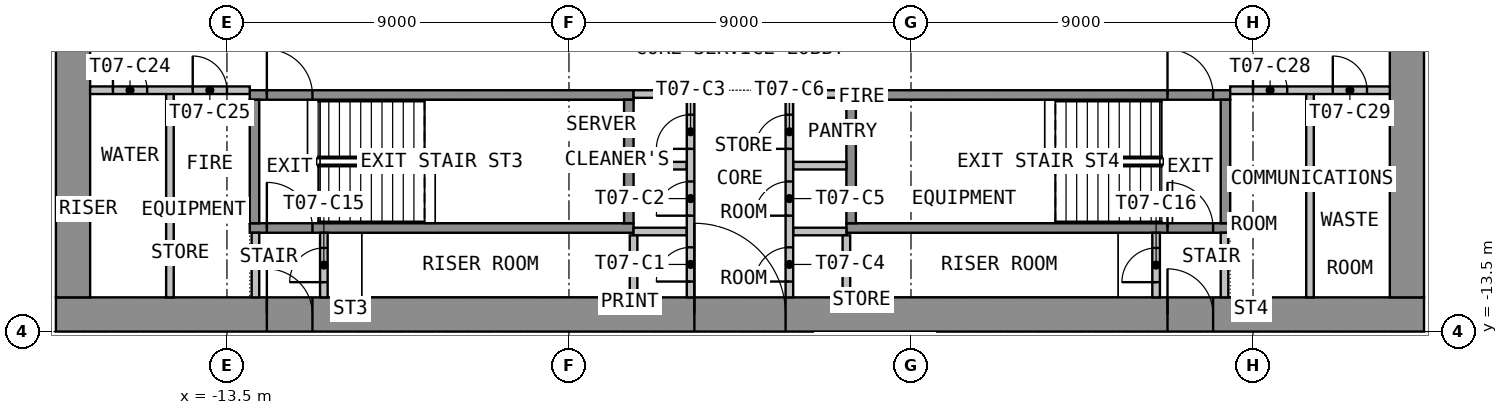
"""IFC4 building model, lengths in metres.
Left out: names, types, materials, properties, quantities, classifications, styles, units other than length and angle.
Written with IfcOpenShell. Run it as: python <this file> out.ifc"""

import sys

from ifc_helpers import new_model, si_unit, direction, frame, frame_2d, origin, place, context, subcontext, project, spatial, rectangle, extrude, element, fill, save


model = new_model("IFC4")
c1 = context("Model", 3, precision=1e-05, world=origin(), true_north=direction((0.0, 1.0)))
c2 = subcontext(c1, "Body", "Model", "MODEL_VIEW")
j1 = project(units=[si_unit("LENGTHUNIT", "METRE"), si_unit("PLANEANGLEUNIT", "RADIAN")], contexts=[c1])
p1 = place(None, origin())
s1 = spatial("IfcSite", under=j1, at=p1, CompositionType="ELEMENT")
p2 = place(p1, origin())
s2 = spatial("IfcBuilding", under=s1, at=p2, CompositionType="ELEMENT")
p3 = place(p2, frame((0.0, 0.0, 104.7)))
s3 = spatial("IfcBuildingStorey", under=s2, at=p3, CompositionType="ELEMENT", Elevation=104.7)
p4 = place(p3, frame((-18.0, -13.05, 0.0), z_axis=(0.0, 0.0, 1.0), x_axis=(1.0, 0.0, 0.0)))
e1 = element("IfcWall", 1, at=p4, inside=s3, PredefinedType="SHEAR", context=c2, shape_type="SweptSolid", body=[
    extrude(rectangle(XDim=36.0, YDim=0.9, at=frame_2d((18.0, 0.0))), origin(), (0.0, 0.0, 1.0), 3.525),
])
p5 = place(p4, frame((16.8, 0.0, 0.0)))
e2 = element("IfcOpeningElement", 2, at=p5, cuts=e1, PredefinedType="OPENING", context=c2, shape_type="SweptSolid", body=[
    extrude(rectangle(XDim=2.4, YDim=2.1, at=frame_2d((1.2, 1.05))), frame((0.0, 0.46, 0.0), z_axis=(0.0, -1.0, 0.0), x_axis=(1.0, 0.0, 0.0)), (0.0, 0.0, 1.0), 0.92),
])
p6 = place(p4, frame((5.55, 0.0, 0.0)))
e3 = element("IfcOpeningElement", 3, at=p6, cuts=e1, PredefinedType="OPENING", context=c2, shape_type="SweptSolid", body=[
    extrude(rectangle(XDim=1.2, YDim=2.1, at=frame_2d((0.6, 1.05))), frame((0.0, 0.46, 0.0), z_axis=(0.0, -1.0, 0.0), x_axis=(1.0, 0.0, 0.0)), (0.0, 0.0, 1.0), 0.92),
])
p7 = place(p4, frame((29.25, 0.0, 0.0)))
e4 = element("IfcOpeningElement", 4, at=p7, cuts=e1, PredefinedType="OPENING", context=c2, shape_type="SweptSolid", body=[
    extrude(rectangle(XDim=1.2, YDim=2.1, at=frame_2d((0.6, 1.05))), frame((0.0, 0.46, 0.0), z_axis=(0.0, -1.0, 0.0), x_axis=(1.0, 0.0, 0.0)), (0.0, 0.0, 1.0), 0.92),
])
p8 = place(p3, frame((-17.55, -12.6, 0.0), z_axis=(0.0, 0.0, 1.0), x_axis=(0.0, 1.0, 0.0)))
e5 = element("IfcWall", 5, at=p8, inside=s3, PredefinedType="SHEAR", context=c2, shape_type="SweptSolid", body=[
    extrude(rectangle(XDim=25.2, YDim=0.9, at=frame_2d((12.6, 0.0))), origin(), (0.0, 0.0, 1.0), 3.525),
])
p9 = place(p8, frame((11.4, 0.0, 0.0)))
e6 = element("IfcOpeningElement", 6, at=p9, cuts=e5, PredefinedType="OPENING", context=c2, shape_type="SweptSolid", body=[
    extrude(rectangle(XDim=2.4, YDim=2.1, at=frame_2d((1.2, 1.05))), frame((0.0, 0.46, 0.0), z_axis=(0.0, -1.0, 0.0), x_axis=(1.0, 0.0, 0.0)), (0.0, 0.0, 1.0), 0.92),
])
p10 = place(p3, frame((17.55, -12.6, 0.0), z_axis=(0.0, 0.0, 1.0), x_axis=(0.0, 1.0, 0.0)))
e7 = element("IfcWall", 7, at=p10, inside=s3, PredefinedType="SHEAR", context=c2, shape_type="SweptSolid", body=[
    extrude(rectangle(XDim=25.2, YDim=0.9, at=frame_2d((12.6, 0.0))), origin(), (0.0, 0.0, 1.0), 3.525),
])
p11 = place(p10, frame((11.4, 0.0, 0.0)))
e8 = element("IfcOpeningElement", 8, at=p11, cuts=e7, PredefinedType="OPENING", context=c2, shape_type="SweptSolid", body=[
    extrude(rectangle(XDim=2.4, YDim=2.1, at=frame_2d((1.2, 1.05))), frame((0.0, 0.46, 0.0), z_axis=(0.0, -1.0, 0.0), x_axis=(1.0, 0.0, 0.0)), (0.0, 0.0, 1.0), 0.92),
])
p12 = place(p3, frame((-12.9, -10.775, 0.0), z_axis=(0.0, 0.0, 1.0), x_axis=(1.0, 0.0, 0.0)))
e9 = element("IfcWall", 9, at=p12, inside=s3, PredefinedType="SHEAR", context=c2, shape_type="SweptSolid", body=[
    extrude(rectangle(XDim=10.1, YDim=0.25, at=frame_2d((5.05, 0.0))), origin(), (0.0, 0.0, 1.0), 3.525),
])
p13 = place(p12, frame((0.45, 0.0, 0.0)))
e10 = element("IfcOpeningElement", 10, at=p13, cuts=e9, PredefinedType="OPENING", context=c2, shape_type="SweptSolid", body=[
    extrude(rectangle(XDim=1.2, YDim=2.1, at=frame_2d((0.6, 1.05))), frame((0.0, 0.135, 0.0), z_axis=(0.0, -1.0, 0.0), x_axis=(1.0, 0.0, 0.0)), (0.0, 0.0, 1.0), 0.27),
])
p14 = place(p3, frame((-12.9, -7.275, 0.0), z_axis=(0.0, 0.0, 1.0), x_axis=(1.0, 0.0, 0.0)))
e11 = element("IfcWall", 11, at=p14, inside=s3, PredefinedType="SHEAR", context=c2, shape_type="SweptSolid", body=[
    extrude(rectangle(XDim=10.1, YDim=0.25, at=frame_2d((5.05, 0.0))), origin(), (0.0, 0.0, 1.0), 3.525),
])
p15 = place(p14, frame((0.45, 0.0, 0.0)))
e12 = element("IfcOpeningElement", 12, at=p15, cuts=e11, PredefinedType="OPENING", context=c2, shape_type="SweptSolid", body=[
    extrude(rectangle(XDim=1.2, YDim=2.1, at=frame_2d((0.6, 1.05))), frame((0.0, 0.135, 0.0), z_axis=(0.0, -1.0, 0.0), x_axis=(1.0, 0.0, 0.0)), (0.0, 0.0, 1.0), 0.27),
])
for number, where, z_axis, x_axis in (
    (13, (-12.775, -10.65, 0.0), (0.0, 0.0, 1.0), (0.0, 1.0, 0.0)),
    (14, (-2.925, -10.65, 0.0), (0.0, 0.0, 1.0), (0.0, 1.0, 0.0)),
):
    element("IfcWall", number, at=place(p3, frame(where, z_axis=z_axis, x_axis=x_axis)), inside=s3, PredefinedType="SHEAR", context=c2, shape_type="SweptSolid", body=[
        extrude(rectangle(XDim=3.25, YDim=0.25, at=frame_2d((1.625, 0.0))), origin(), (0.0, 0.0, 1.0), 3.525),
    ])
p16 = place(p3, frame((2.8, -10.775, 0.0), z_axis=(0.0, 0.0, 1.0), x_axis=(1.0, 0.0, 0.0)))
e15 = element("IfcWall", 15, at=p16, inside=s3, PredefinedType="SHEAR", context=c2, shape_type="SweptSolid", body=[
    extrude(rectangle(XDim=10.1, YDim=0.25, at=frame_2d((5.05, 0.0))), origin(), (0.0, 0.0, 1.0), 3.525),
])
p17 = place(p16, frame((8.45, 0.0, 0.0)))
e16 = element("IfcOpeningElement", 16, at=p17, cuts=e15, PredefinedType="OPENING", context=c2, shape_type="SweptSolid", body=[
    extrude(rectangle(XDim=1.2, YDim=2.1, at=frame_2d((0.6, 1.05))), frame((0.0, 0.135, 0.0), z_axis=(0.0, -1.0, 0.0), x_axis=(1.0, 0.0, 0.0)), (0.0, 0.0, 1.0), 0.27),
])
p18 = place(p3, frame((2.8, -7.275, 0.0), z_axis=(0.0, 0.0, 1.0), x_axis=(1.0, 0.0, 0.0)))
e17 = element("IfcWall", 17, at=p18, inside=s3, PredefinedType="SHEAR", context=c2, shape_type="SweptSolid", body=[
    extrude(rectangle(XDim=10.1, YDim=0.25, at=frame_2d((5.05, 0.0))), origin(), (0.0, 0.0, 1.0), 3.525),
])
p19 = place(p18, frame((8.45, 0.0, 0.0)))
e18 = element("IfcOpeningElement", 18, at=p19, cuts=e17, PredefinedType="OPENING", context=c2, shape_type="SweptSolid", body=[
    extrude(rectangle(XDim=1.2, YDim=2.1, at=frame_2d((0.6, 1.05))), frame((0.0, 0.135, 0.0), z_axis=(0.0, -1.0, 0.0), x_axis=(1.0, 0.0, 0.0)), (0.0, 0.0, 1.0), 0.27),
])
for number, where, z_axis, x_axis in (
    (19, (2.925, -10.65, 0.0), (0.0, 0.0, 1.0), (0.0, 1.0, 0.0)),
    (20, (12.775, -10.65, 0.0), (0.0, 0.0, 1.0), (0.0, 1.0, 0.0)),
):
    element("IfcWall", number, at=place(p3, frame(where, z_axis=z_axis, x_axis=x_axis)), inside=s3, PredefinedType="SHEAR", context=c2, shape_type="SweptSolid", body=[
        extrude(rectangle(XDim=3.25, YDim=0.25, at=frame_2d((1.625, 0.0))), origin(), (0.0, 0.0, 1.0), 3.525),
    ])
for number, where, z_axis, x_axis in (
    (21, (-2.8, -7.25, 0.0), (0.0, 0.0, 1.0), (1.0, 0.0, 0.0)),
    (22, (-2.8, -9.135, 0.0), (0.0, 0.0, 1.0), (1.0, 0.0, 0.0)),
    (23, (-2.8, -10.867, 0.0), (0.0, 0.0, 1.0), (1.0, 0.0, 0.0)),
    (24, (1.4, -7.25, 0.0), (0.0, 0.0, 1.0), (1.0, 0.0, 0.0)),
    (25, (1.4, -9.135, 0.0), (0.0, 0.0, 1.0), (1.0, 0.0, 0.0)),
    (26, (1.4, -10.867, 0.0), (0.0, 0.0, 1.0), (1.0, 0.0, 0.0)),
):
    element("IfcWall", number, at=place(p3, frame(where, z_axis=z_axis, x_axis=x_axis)), inside=s3, PredefinedType="PARTITIONING", context=c2, shape_type="SweptSolid", body=[
        extrude(rectangle(XDim=1.4, YDim=0.2, at=frame_2d((0.7, 0.0))), origin(), (0.0, 0.0, 1.0), 3.525),
    ])
p20 = place(p3, frame((-1.3, -12.6, 0.0), z_axis=(0.0, 0.0, 1.0), x_axis=(0.0, 1.0, 0.0)))
e27 = element("IfcWall", 27, at=p20, inside=s3, PredefinedType="PARTITIONING", context=c2, shape_type="SweptSolid", body=[
    extrude(rectangle(XDim=5.45, YDim=0.2, at=frame_2d((2.725, 0.0))), origin(), (0.0, 0.0, 1.0), 3.525),
])
p21 = place(p20, frame((0.416, 0.0, 0.0)))
e28 = element("IfcOpeningElement", 28, at=p21, cuts=e27, PredefinedType="OPENING", context=c2, shape_type="SweptSolid", body=[
    extrude(rectangle(XDim=0.9, YDim=2.1, at=frame_2d((0.45, 1.05))), frame((0.0, 0.11, 0.0), z_axis=(0.0, -1.0, 0.0), x_axis=(1.0, 0.0, 0.0)), (0.0, 0.0, 1.0), 0.22),
])
p22 = place(p20, frame((2.149, 0.0, 0.0)))
e29 = element("IfcOpeningElement", 29, at=p22, cuts=e27, PredefinedType="OPENING", context=c2, shape_type="SweptSolid", body=[
    extrude(rectangle(XDim=0.9, YDim=2.1, at=frame_2d((0.45, 1.05))), frame((0.0, 0.11, 0.0), z_axis=(0.0, -1.0, 0.0), x_axis=(1.0, 0.0, 0.0)), (0.0, 0.0, 1.0), 0.22),
])
p23 = place(p20, frame((3.907, 0.0, 0.0)))
e30 = element("IfcOpeningElement", 30, at=p23, cuts=e27, PredefinedType="OPENING", context=c2, shape_type="SweptSolid", body=[
    extrude(rectangle(XDim=0.9, YDim=2.1, at=frame_2d((0.45, 1.05))), frame((0.0, 0.11, 0.0), z_axis=(0.0, -1.0, 0.0), x_axis=(1.0, 0.0, 0.0)), (0.0, 0.0, 1.0), 0.22),
])
p24 = place(p3, frame((1.3, -12.6, 0.0), z_axis=(0.0, 0.0, 1.0), x_axis=(0.0, 1.0, 0.0)))
e31 = element("IfcWall", 31, at=p24, inside=s3, PredefinedType="PARTITIONING", context=c2, shape_type="SweptSolid", body=[
    extrude(rectangle(XDim=5.45, YDim=0.2, at=frame_2d((2.725, 0.0))), origin(), (0.0, 0.0, 1.0), 3.525),
])
p25 = place(p24, frame((0.416, 0.0, 0.0)))
e32 = element("IfcOpeningElement", 32, at=p25, cuts=e31, PredefinedType="OPENING", context=c2, shape_type="SweptSolid", body=[
    extrude(rectangle(XDim=0.9, YDim=2.1, at=frame_2d((0.45, 1.05))), frame((0.0, 0.11, 0.0), z_axis=(0.0, -1.0, 0.0), x_axis=(1.0, 0.0, 0.0)), (0.0, 0.0, 1.0), 0.22),
])
p26 = place(p24, frame((2.149, 0.0, 0.0)))
e33 = element("IfcOpeningElement", 33, at=p26, cuts=e31, PredefinedType="OPENING", context=c2, shape_type="SweptSolid", body=[
    extrude(rectangle(XDim=0.9, YDim=2.1, at=frame_2d((0.45, 1.05))), frame((0.0, 0.11, 0.0), z_axis=(0.0, -1.0, 0.0), x_axis=(1.0, 0.0, 0.0)), (0.0, 0.0, 1.0), 0.22),
])
p27 = place(p24, frame((3.907, 0.0, 0.0)))
e34 = element("IfcOpeningElement", 34, at=p27, cuts=e31, PredefinedType="OPENING", context=c2, shape_type="SweptSolid", body=[
    extrude(rectangle(XDim=0.9, YDim=2.1, at=frame_2d((0.45, 1.05))), frame((0.0, 0.11, 0.0), z_axis=(0.0, -1.0, 0.0), x_axis=(1.0, 0.0, 0.0)), (0.0, 0.0, 1.0), 0.22),
])
p28 = place(p3, frame((-12.75, -12.6, 0.0), z_axis=(0.0, 0.0, 1.0), x_axis=(0.0, 1.0, 0.0)))
e35 = element("IfcWall", 35, at=p28, inside=s3, PredefinedType="PARTITIONING", context=c2, shape_type="SweptSolid", body=[
    extrude(rectangle(XDim=1.7, YDim=0.2, at=frame_2d((0.85, 0.0))), origin(), (0.0, 0.0, 1.0), 3.525),
])
p29 = place(p3, frame((-10.95, -12.6, 0.0), z_axis=(0.0, 0.0, 1.0), x_axis=(0.0, 1.0, 0.0)))
e36 = element("IfcWall", 36, at=p29, inside=s3, PredefinedType="PARTITIONING", context=c2, shape_type="SweptSolid", body=[
    extrude(rectangle(XDim=1.7, YDim=0.2, at=frame_2d((0.85, 0.0))), origin(), (0.0, 0.0, 1.0), 3.525),
])
p30 = place(p29, frame((0.4, 0.0, 0.0)))
e37 = element("IfcOpeningElement", 37, at=p30, cuts=e36, PredefinedType="OPENING", context=c2, shape_type="SweptSolid", body=[
    extrude(rectangle(XDim=0.9, YDim=2.1, at=frame_2d((0.45, 1.05))), frame((0.0, 0.11, 0.0), z_axis=(0.0, -1.0, 0.0), x_axis=(1.0, 0.0, 0.0)), (0.0, 0.0, 1.0), 0.22),
])
p31 = place(p3, frame((12.75, -12.6, 0.0), z_axis=(0.0, 0.0, 1.0), x_axis=(0.0, 1.0, 0.0)))
e38 = element("IfcWall", 38, at=p31, inside=s3, PredefinedType="PARTITIONING", context=c2, shape_type="SweptSolid", body=[
    extrude(rectangle(XDim=1.7, YDim=0.2, at=frame_2d((0.85, 0.0))), origin(), (0.0, 0.0, 1.0), 3.525),
])
p32 = place(p3, frame((10.95, -12.6, 0.0), z_axis=(0.0, 0.0, 1.0), x_axis=(0.0, 1.0, 0.0)))
e39 = element("IfcWall", 39, at=p32, inside=s3, PredefinedType="PARTITIONING", context=c2, shape_type="SweptSolid", body=[
    extrude(rectangle(XDim=1.7, YDim=0.2, at=frame_2d((0.85, 0.0))), origin(), (0.0, 0.0, 1.0), 3.525),
])
p33 = place(p32, frame((0.4, 0.0, 0.0)))
e40 = element("IfcOpeningElement", 40, at=p33, cuts=e39, PredefinedType="OPENING", context=c2, shape_type="SweptSolid", body=[
    extrude(rectangle(XDim=0.9, YDim=2.1, at=frame_2d((0.45, 1.05))), frame((0.0, 0.11, 0.0), z_axis=(0.0, -1.0, 0.0), x_axis=(1.0, 0.0, 0.0)), (0.0, 0.0, 1.0), 0.22),
])
p34 = place(p3, frame((-15.0, -12.6, 0.0), z_axis=(0.0, 0.0, 1.0), x_axis=(0.0, 1.0, 0.0)))
e41 = element("IfcWall", 41, at=p34, inside=s3, PredefinedType="PARTITIONING", context=c2, shape_type="SweptSolid", body=[
    extrude(rectangle(XDim=5.45, YDim=0.2, at=frame_2d((2.725, 0.0))), origin(), (0.0, 0.0, 1.0), 3.525),
])
p35 = place(p3, frame((-17.1, -7.15, 0.0), z_axis=(0.0, 0.0, 1.0), x_axis=(1.0, 0.0, 0.0)))
e42 = element("IfcWall", 42, at=p35, inside=s3, PredefinedType="PARTITIONING", context=c2, shape_type="SweptSolid", body=[
    extrude(rectangle(XDim=4.2, YDim=0.2, at=frame_2d((2.1, 0.0))), origin(), (0.0, 0.0, 1.0), 3.525),
])
p36 = place(p35, frame((0.6, 0.0, 0.0)))
e43 = element("IfcOpeningElement", 43, at=p36, cuts=e42, PredefinedType="OPENING", context=c2, shape_type="SweptSolid", body=[
    extrude(rectangle(XDim=0.9, YDim=2.1, at=frame_2d((0.45, 1.05))), frame((0.0, 0.11, 0.0), z_axis=(0.0, -1.0, 0.0), x_axis=(1.0, 0.0, 0.0)), (0.0, 0.0, 1.0), 0.22),
])
p37 = place(p35, frame((2.7, 0.0, 0.0)))
e44 = element("IfcOpeningElement", 44, at=p37, cuts=e42, PredefinedType="OPENING", context=c2, shape_type="SweptSolid", body=[
    extrude(rectangle(XDim=0.9, YDim=2.1, at=frame_2d((0.45, 1.05))), frame((0.0, 0.11, 0.0), z_axis=(0.0, -1.0, 0.0), x_axis=(1.0, 0.0, 0.0)), (0.0, 0.0, 1.0), 0.22),
])
p38 = place(p3, frame((15.0, -12.6, 0.0), z_axis=(0.0, 0.0, 1.0), x_axis=(0.0, 1.0, 0.0)))
e45 = element("IfcWall", 45, at=p38, inside=s3, PredefinedType="PARTITIONING", context=c2, shape_type="SweptSolid", body=[
    extrude(rectangle(XDim=5.45, YDim=0.2, at=frame_2d((2.725, 0.0))), origin(), (0.0, 0.0, 1.0), 3.525),
])
p39 = place(p3, frame((12.9, -7.15, 0.0), z_axis=(0.0, 0.0, 1.0), x_axis=(1.0, 0.0, 0.0)))
e46 = element("IfcWall", 46, at=p39, inside=s3, PredefinedType="PARTITIONING", context=c2, shape_type="SweptSolid", body=[
    extrude(rectangle(XDim=4.2, YDim=0.2, at=frame_2d((2.1, 0.0))), origin(), (0.0, 0.0, 1.0), 3.525),
])
p40 = place(p39, frame((0.6, 0.0, 0.0)))
e47 = element("IfcOpeningElement", 47, at=p40, cuts=e46, PredefinedType="OPENING", context=c2, shape_type="SweptSolid", body=[
    extrude(rectangle(XDim=0.9, YDim=2.1, at=frame_2d((0.45, 1.05))), frame((0.0, 0.11, 0.0), z_axis=(0.0, -1.0, 0.0), x_axis=(1.0, 0.0, 0.0)), (0.0, 0.0, 1.0), 0.22),
])
p41 = place(p39, frame((2.7, 0.0, 0.0)))
e48 = element("IfcOpeningElement", 48, at=p41, cuts=e46, PredefinedType="OPENING", context=c2, shape_type="SweptSolid", body=[
    extrude(rectangle(XDim=0.9, YDim=2.1, at=frame_2d((0.45, 1.05))), frame((0.0, 0.11, 0.0), z_axis=(0.0, -1.0, 0.0), x_axis=(1.0, 0.0, 0.0)), (0.0, 0.0, 1.0), 0.22),
])
for number, where, z_axis, x_axis in (
    (49, (-2.8, -12.599, 0.0), (0.0, 0.0, 1.0), (0.0, 1.0, 0.0)),
    (50, (2.8, -12.599, 0.0), (0.0, 0.0, 1.0), (0.0, 1.0, 0.0)),
):
    element("IfcWall", number, at=place(p3, frame(where, z_axis=z_axis, x_axis=x_axis)), inside=s3, PredefinedType="PARTITIONING", context=c2, shape_type="SweptSolid", body=[
        extrude(rectangle(XDim=1.631, YDim=0.2, at=frame_2d((0.815, 0.0))), origin(), (0.0, 0.0, 1.0), 3.525),
    ])
p42 = place(p5, origin())
e51 = element("IfcDoor", 51, at=p42, inside=s3, OperationType="DOUBLE_DOOR_DOUBLE_SWING", PredefinedType="DOOR", context=c2, shape_type="SweptSolid", body=[
    extrude(rectangle(XDim=2.4, YDim=2.1, at=frame_2d((1.2, 1.05))), frame((0.0, 0.025, 0.0), z_axis=(0.0, -1.0, 0.0), x_axis=(1.0, 0.0, 0.0)), (0.0, 0.0, 1.0), 0.05),
])
fill(e2, e51)
p43 = place(p6, origin())
e52 = element("IfcDoor", 52, at=p43, inside=s3, OperationType="SINGLE_SWING_RIGHT", PredefinedType="DOOR", context=c2, shape_type="SweptSolid", body=[
    extrude(rectangle(XDim=1.2, YDim=2.1, at=frame_2d((0.6, 1.05))), frame((0.0, 0.025, 0.0), z_axis=(0.0, -1.0, 0.0), x_axis=(1.0, 0.0, 0.0)), (0.0, 0.0, 1.0), 0.05),
])
fill(e3, e52)
p44 = place(p7, origin())
e53 = element("IfcDoor", 53, at=p44, inside=s3, OperationType="SINGLE_SWING_RIGHT", PredefinedType="DOOR", context=c2, shape_type="SweptSolid", body=[
    extrude(rectangle(XDim=1.2, YDim=2.1, at=frame_2d((0.6, 1.05))), frame((0.0, 0.025, 0.0), z_axis=(0.0, -1.0, 0.0), x_axis=(1.0, 0.0, 0.0)), (0.0, 0.0, 1.0), 0.05),
])
fill(e4, e53)
p45 = place(p15, origin())
e54 = element("IfcDoor", 54, at=p45, inside=s3, OperationType="SINGLE_SWING_LEFT", PredefinedType="DOOR", context=c2, shape_type="SweptSolid", body=[
    extrude(rectangle(XDim=1.2, YDim=2.1, at=frame_2d((0.6, 1.05))), frame((0.0, 0.025, 0.0), z_axis=(0.0, -1.0, 0.0), x_axis=(1.0, 0.0, 0.0)), (0.0, 0.0, 1.0), 0.05),
])
fill(e12, e54)
p46 = place(p19, origin())
e55 = element("IfcDoor", 55, at=p46, inside=s3, OperationType="SINGLE_SWING_LEFT", PredefinedType="DOOR", context=c2, shape_type="SweptSolid", body=[
    extrude(rectangle(XDim=1.2, YDim=2.1, at=frame_2d((0.6, 1.05))), frame((0.0, 0.025, 0.0), z_axis=(0.0, -1.0, 0.0), x_axis=(1.0, 0.0, 0.0)), (0.0, 0.0, 1.0), 0.05),
])
fill(e18, e55)
p47 = place(p21, origin())
e56 = element("IfcDoor", 56, at=p47, inside=s3, OperationType="SINGLE_SWING_LEFT", PredefinedType="DOOR", context=c2, shape_type="SweptSolid", body=[
    extrude(rectangle(XDim=0.9, YDim=2.1, at=frame_2d((0.45, 1.05))), frame((0.0, 0.025, 0.0), z_axis=(0.0, -1.0, 0.0), x_axis=(1.0, 0.0, 0.0)), (0.0, 0.0, 1.0), 0.05),
])
fill(e28, e56)
p48 = place(p22, origin())
e57 = element("IfcDoor", 57, at=p48, inside=s3, OperationType="SINGLE_SWING_LEFT", PredefinedType="DOOR", context=c2, shape_type="SweptSolid", body=[
    extrude(rectangle(XDim=0.9, YDim=2.1, at=frame_2d((0.45, 1.05))), frame((0.0, 0.025, 0.0), z_axis=(0.0, -1.0, 0.0), x_axis=(1.0, 0.0, 0.0)), (0.0, 0.0, 1.0), 0.05),
])
fill(e29, e57)
p49 = place(p23, origin())
e58 = element("IfcDoor", 58, at=p49, inside=s3, OperationType="SINGLE_SWING_LEFT", PredefinedType="DOOR", context=c2, shape_type="SweptSolid", body=[
    extrude(rectangle(XDim=0.9, YDim=2.1, at=frame_2d((0.45, 1.05))), frame((0.0, 0.025, 0.0), z_axis=(0.0, -1.0, 0.0), x_axis=(1.0, 0.0, 0.0)), (0.0, 0.0, 1.0), 0.05),
])
fill(e30, e58)
p50 = place(p25, origin())
e59 = element("IfcDoor", 59, at=p50, inside=s3, OperationType="SINGLE_SWING_LEFT", PredefinedType="DOOR", context=c2, shape_type="SweptSolid", body=[
    extrude(rectangle(XDim=0.9, YDim=2.1, at=frame_2d((0.45, 1.05))), frame((0.0, 0.025, 0.0), z_axis=(0.0, -1.0, 0.0), x_axis=(1.0, 0.0, 0.0)), (0.0, 0.0, 1.0), 0.05),
])
fill(e32, e59)
p51 = place(p26, origin())
e60 = element("IfcDoor", 60, at=p51, inside=s3, OperationType="SINGLE_SWING_LEFT", PredefinedType="DOOR", context=c2, shape_type="SweptSolid", body=[
    extrude(rectangle(XDim=0.9, YDim=2.1, at=frame_2d((0.45, 1.05))), frame((0.0, 0.025, 0.0), z_axis=(0.0, -1.0, 0.0), x_axis=(1.0, 0.0, 0.0)), (0.0, 0.0, 1.0), 0.05),
])
fill(e33, e60)
p52 = place(p27, origin())
e61 = element("IfcDoor", 61, at=p52, inside=s3, OperationType="SINGLE_SWING_LEFT", PredefinedType="DOOR", context=c2, shape_type="SweptSolid", body=[
    extrude(rectangle(XDim=0.9, YDim=2.1, at=frame_2d((0.45, 1.05))), frame((0.0, 0.025, 0.0), z_axis=(0.0, -1.0, 0.0), x_axis=(1.0, 0.0, 0.0)), (0.0, 0.0, 1.0), 0.05),
])
fill(e34, e61)
p53 = place(p13, origin())
e62 = element("IfcDoor", 62, at=p53, inside=s3, OperationType="SINGLE_SWING_RIGHT", PredefinedType="DOOR", context=c2, shape_type="SweptSolid", body=[
    extrude(rectangle(XDim=1.2, YDim=2.1, at=frame_2d((0.6, 1.05))), frame((0.0, 0.025, 0.0), z_axis=(0.0, -1.0, 0.0), x_axis=(1.0, 0.0, 0.0)), (0.0, 0.0, 1.0), 0.05),
])
fill(e10, e62)
p54 = place(p30, origin())
e63 = element("IfcDoor", 63, at=p54, inside=s3, OperationType="SINGLE_SWING_LEFT", PredefinedType="DOOR", context=c2, shape_type="SweptSolid", body=[
    extrude(rectangle(XDim=0.9, YDim=2.1, at=frame_2d((0.45, 1.05))), frame((0.0, 0.025, 0.0), z_axis=(0.0, -1.0, 0.0), x_axis=(1.0, 0.0, 0.0)), (0.0, 0.0, 1.0), 0.05),
])
fill(e37, e63)
p55 = place(p17, origin())
e64 = element("IfcDoor", 64, at=p55, inside=s3, OperationType="SINGLE_SWING_RIGHT", PredefinedType="DOOR", context=c2, shape_type="SweptSolid", body=[
    extrude(rectangle(XDim=1.2, YDim=2.1, at=frame_2d((0.6, 1.05))), frame((0.0, 0.025, 0.0), z_axis=(0.0, -1.0, 0.0), x_axis=(1.0, 0.0, 0.0)), (0.0, 0.0, 1.0), 0.05),
])
fill(e16, e64)
p56 = place(p33, origin())
e65 = element("IfcDoor", 65, at=p56, inside=s3, OperationType="SINGLE_SWING_LEFT", PredefinedType="DOOR", context=c2, shape_type="SweptSolid", body=[
    extrude(rectangle(XDim=0.9, YDim=2.1, at=frame_2d((0.45, 1.05))), frame((0.0, 0.025, 0.0), z_axis=(0.0, -1.0, 0.0), x_axis=(1.0, 0.0, 0.0)), (0.0, 0.0, 1.0), 0.05),
])
fill(e40, e65)
p57 = place(p36, origin())
e66 = element("IfcDoor", 66, at=p57, inside=s3, OperationType="SINGLE_SWING_LEFT", PredefinedType="DOOR", context=c2, shape_type="SweptSolid", body=[
    extrude(rectangle(XDim=0.9, YDim=2.1, at=frame_2d((0.45, 1.05))), frame((0.0, 0.025, 0.0), z_axis=(0.0, -1.0, 0.0), x_axis=(1.0, 0.0, 0.0)), (0.0, 0.0, 1.0), 0.05),
])
fill(e43, e66)
p58 = place(p37, origin())
e67 = element("IfcDoor", 67, at=p58, inside=s3, OperationType="SINGLE_SWING_LEFT", PredefinedType="DOOR", context=c2, shape_type="SweptSolid", body=[
    extrude(rectangle(XDim=0.9, YDim=2.1, at=frame_2d((0.45, 1.05))), frame((0.0, 0.025, 0.0), z_axis=(0.0, -1.0, 0.0), x_axis=(1.0, 0.0, 0.0)), (0.0, 0.0, 1.0), 0.05),
])
fill(e44, e67)
p59 = place(p40, origin())
e68 = element("IfcDoor", 68, at=p59, inside=s3, OperationType="SINGLE_SWING_LEFT", PredefinedType="DOOR", context=c2, shape_type="SweptSolid", body=[
    extrude(rectangle(XDim=0.9, YDim=2.1, at=frame_2d((0.45, 1.05))), frame((0.0, 0.025, 0.0), z_axis=(0.0, -1.0, 0.0), x_axis=(1.0, 0.0, 0.0)), (0.0, 0.0, 1.0), 0.05),
])
fill(e47, e68)
p60 = place(p41, origin())
e69 = element("IfcDoor", 69, at=p60, inside=s3, OperationType="SINGLE_SWING_LEFT", PredefinedType="DOOR", context=c2, shape_type="SweptSolid", body=[
    extrude(rectangle(XDim=0.9, YDim=2.1, at=frame_2d((0.45, 1.05))), frame((0.0, 0.025, 0.0), z_axis=(0.0, -1.0, 0.0), x_axis=(1.0, 0.0, 0.0)), (0.0, 0.0, 1.0), 0.05),
])
fill(e48, e69)
save(model, sys.argv[1])
